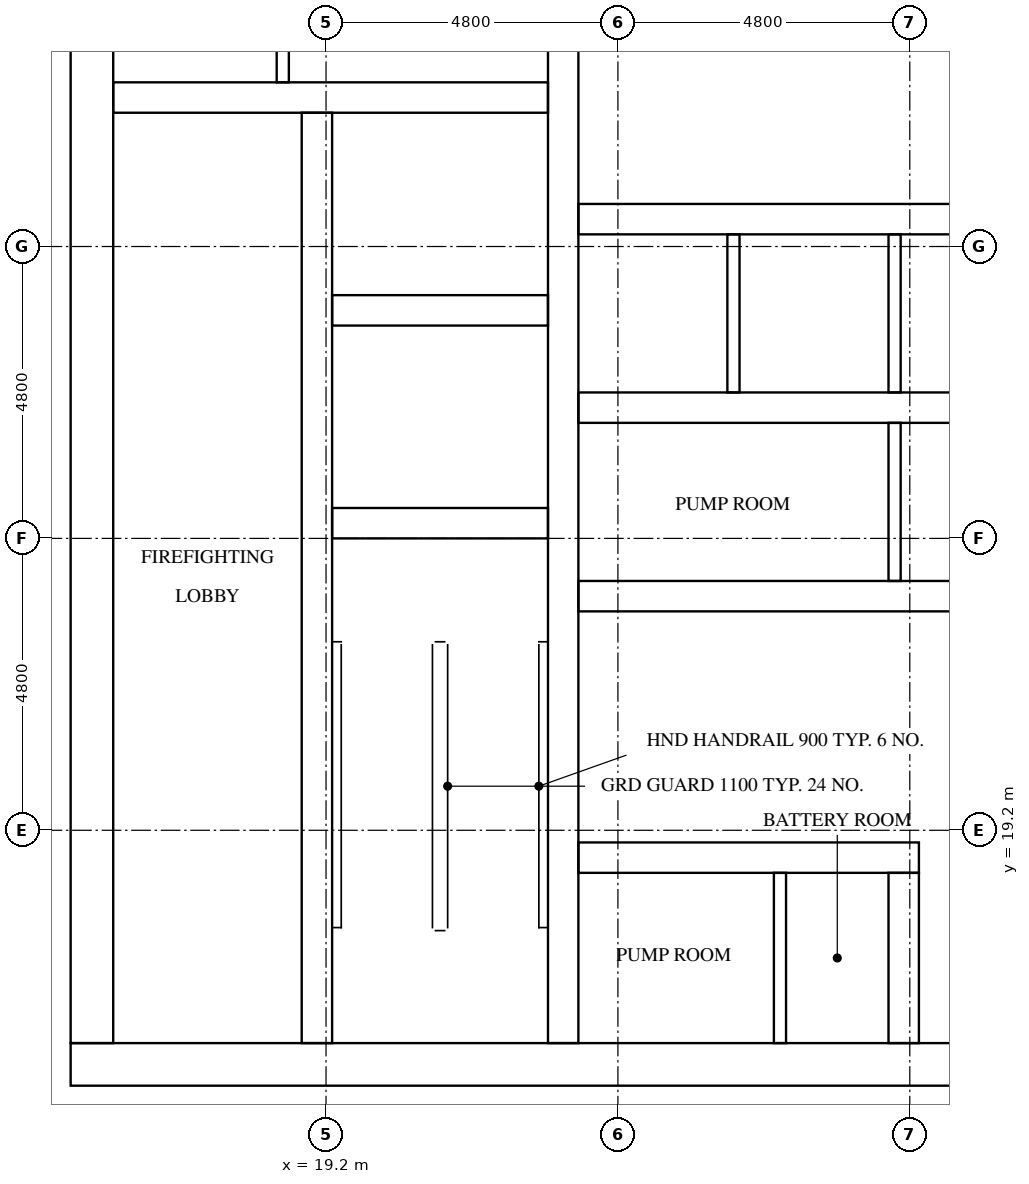
"""IFC4 building model, lengths in metres.
Left out: names, types, materials, properties, quantities, classifications, styles, units other than length and angle.
Written with IfcOpenShell. Run it as: python <this file> out.ifc"""

import sys

from ifc_helpers import new_model, si_unit, direction, frame, frame_2d, origin, place, context, subcontext, project, spatial, rectangle, extrude, element, fill, save


model = new_model("IFC4")
c1 = context("Model", 3, precision=1e-05, world=origin(), true_north=direction((0.0, 1.0)))
c2 = subcontext(c1, "Body", "Model", "MODEL_VIEW")
j1 = project(units=[si_unit("LENGTHUNIT", "METRE"), si_unit("PLANEANGLEUNIT", "RADIAN")], contexts=[c1])
p1 = place(None, origin())
s1 = spatial("IfcSite", under=j1, at=p1, CompositionType="ELEMENT")
p2 = place(p1, origin())
s2 = spatial("IfcBuilding", under=s1, at=p2, CompositionType="ELEMENT")
p3 = place(p2, frame((0.0, 0.0, 203.4)))
s3 = spatial("IfcBuildingStorey", under=s2, at=p3, CompositionType="ELEMENT", Elevation=203.4)
p4 = place(p3, frame((15.0, 15.35, 0.0), z_axis=(0.0, 0.0, 1.0), x_axis=(1.0, 0.0, 0.0)))
e1 = element("IfcWall", 1, at=p4, inside=s3, PredefinedType="SHEAR", context=c2, shape_type="SweptSolid", body=[
    extrude(rectangle(XDim=32.4, YDim=0.7, at=frame_2d((16.2, 0.0))), origin(), (0.0, 0.0, 1.0), 5.1),
])
p5 = place(p4, frame((15.3, 0.0, 0.0)))
e2 = element("IfcOpeningElement", 2, at=p5, cuts=e1, PredefinedType="OPENING", context=c2, shape_type="SweptSolid", body=[
    extrude(rectangle(XDim=1.8, YDim=2.1, at=frame_2d((0.9, 1.05))), frame((0.0, 0.36, 0.0), z_axis=(0.0, -1.0, 0.0), x_axis=(1.0, 0.0, 0.0)), (0.0, 0.0, 1.0), 0.72),
])
p6 = place(p3, frame((15.35, 15.7, 0.0), z_axis=(0.0, 0.0, 1.0), x_axis=(0.0, 1.0, 0.0)))
e3 = element("IfcWall", 3, at=p6, inside=s3, PredefinedType="SHEAR", context=c2, shape_type="SweptSolid", body=[
    extrude(rectangle(XDim=21.4, YDim=0.7, at=frame_2d((10.7, 0.0))), origin(), (0.0, 0.0, 1.0), 5.1),
])
p7 = place(p6, frame((5.06, 0.0, 0.0)))
e4 = element("IfcOpeningElement", 4, at=p7, cuts=e3, PredefinedType="OPENING", context=c2, shape_type="SweptSolid", body=[
    extrude(rectangle(XDim=1.2, YDim=2.1, at=frame_2d((0.6, 1.05))), frame((0.0, 0.36, 0.0), z_axis=(0.0, -1.0, 0.0), x_axis=(1.0, 0.0, 0.0)), (0.0, 0.0, 1.0), 0.72),
])
p8 = place(p3, frame((19.05, 15.7, 0.0), z_axis=(0.0, 0.0, 1.0), x_axis=(0.0, 1.0, 0.0)))
e5 = element("IfcWall", 5, at=p8, inside=s3, PredefinedType="SHEAR", context=c2, shape_type="SweptSolid", body=[
    extrude(rectangle(XDim=15.3, YDim=0.5, at=frame_2d((7.65, 0.0))), origin(), (0.0, 0.0, 1.0), 5.1),
])
p9 = place(p8, frame((9.75, 0.0, 0.0)))
e6 = element("IfcOpeningElement", 6, at=p9, cuts=e5, PredefinedType="OPENING", context=c2, shape_type="SweptSolid", body=[
    extrude(rectangle(XDim=1.1, YDim=2.1, at=frame_2d((0.55, 1.05))), frame((0.0, 0.26, 0.0), z_axis=(0.0, -1.0, 0.0), x_axis=(1.0, 0.0, 0.0)), (0.0, 0.0, 1.0), 0.52),
])
p10 = place(p8, frame((13.25, 0.0, 0.0)))
e7 = element("IfcOpeningElement", 7, at=p10, cuts=e5, PredefinedType="OPENING", context=c2, shape_type="SweptSolid", body=[
    extrude(rectangle(XDim=1.1, YDim=2.1, at=frame_2d((0.55, 1.05))), frame((0.0, 0.26, 0.0), z_axis=(0.0, -1.0, 0.0), x_axis=(1.0, 0.0, 0.0)), (0.0, 0.0, 1.0), 0.52),
])
p11 = place(p8, frame((0.5, 0.0, 0.0)))
e8 = element("IfcOpeningElement", 8, at=p11, cuts=e5, PredefinedType="OPENING", context=c2, shape_type="SweptSolid", body=[
    extrude(rectangle(XDim=1.2, YDim=2.1, at=frame_2d((0.6, 1.05))), frame((0.0, 0.26, 0.0), z_axis=(0.0, -1.0, 0.0), x_axis=(1.0, 0.0, 0.0)), (0.0, 0.0, 1.0), 0.52),
])
p12 = place(p3, frame((23.1, 15.7, 0.0), z_axis=(0.0, 0.0, 1.0), x_axis=(0.0, 1.0, 0.0)))
e9 = element("IfcWall", 9, at=p12, inside=s3, PredefinedType="SHEAR", context=c2, shape_type="SweptSolid", body=[
    extrude(rectangle(XDim=21.4, YDim=0.5, at=frame_2d((10.7, 0.0))), origin(), (0.0, 0.0, 1.0), 5.1),
])
for number, where, z_axis, x_axis in (
    (10, (19.3, 24.25, 0.0), (0.0, 0.0, 1.0), (1.0, 0.0, 0.0)),
    (11, (19.3, 27.75, 0.0), (0.0, 0.0, 1.0), (1.0, 0.0, 0.0)),
):
    element("IfcWall", number, at=place(p3, frame(where, z_axis=z_axis, x_axis=x_axis)), inside=s3, PredefinedType="SHEAR", context=c2, shape_type="SweptSolid", body=[
        extrude(rectangle(XDim=3.55, YDim=0.5, at=frame_2d((1.775, 0.0))), origin(), (0.0, 0.0, 1.0), 5.1),
    ])
p13 = place(p3, frame((15.7, 31.25, 0.0), z_axis=(0.0, 0.0, 1.0), x_axis=(1.0, 0.0, 0.0)))
e12 = element("IfcWall", 12, at=p13, inside=s3, PredefinedType="SHEAR", context=c2, shape_type="SweptSolid", body=[
    extrude(rectangle(XDim=7.15, YDim=0.5, at=frame_2d((3.575, 0.0))), origin(), (0.0, 0.0, 1.0), 5.1),
])
p14 = place(p3, frame((23.35, 18.75, 0.0), z_axis=(0.0, 0.0, 1.0), x_axis=(1.0, 0.0, 0.0)))
e13 = element("IfcWall", 13, at=p14, inside=s3, PredefinedType="SHEAR", context=c2, shape_type="SweptSolid", body=[
    extrude(rectangle(XDim=5.6, YDim=0.5, at=frame_2d((2.8, 0.0))), origin(), (0.0, 0.0, 1.0), 5.1),
])
p15 = place(p14, frame((1.107, 0.0, 0.0)))
e14 = element("IfcOpeningElement", 14, at=p15, cuts=e13, PredefinedType="OPENING", context=c2, shape_type="SweptSolid", body=[
    extrude(rectangle(XDim=1.0, YDim=2.1, at=frame_2d((0.5, 1.05))), frame((0.0, 0.26, 0.0), z_axis=(0.0, -1.0, 0.0), x_axis=(1.0, 0.0, 0.0)), (0.0, 0.0, 1.0), 0.52),
])
p16 = place(p14, frame((3.758, 0.0, 0.0)))
e15 = element("IfcOpeningElement", 15, at=p16, cuts=e13, PredefinedType="OPENING", context=c2, shape_type="SweptSolid", body=[
    extrude(rectangle(XDim=1.0, YDim=2.1, at=frame_2d((0.5, 1.05))), frame((0.0, 0.26, 0.0), z_axis=(0.0, -1.0, 0.0), x_axis=(1.0, 0.0, 0.0)), (0.0, 0.0, 1.0), 0.52),
])
p17 = place(p3, frame((23.35, 23.05, 0.0), z_axis=(0.0, 0.0, 1.0), x_axis=(1.0, 0.0, 0.0)))
e16 = element("IfcWall", 16, at=p17, inside=s3, PredefinedType="SHEAR", context=c2, shape_type="SweptSolid", body=[
    extrude(rectangle(XDim=15.7, YDim=0.5, at=frame_2d((7.85, 0.0))), origin(), (0.0, 0.0, 1.0), 5.1),
])
p18 = place(p17, frame((2.05, 0.0, 0.0)))
e17 = element("IfcOpeningElement", 17, at=p18, cuts=e16, PredefinedType="OPENING", context=c2, shape_type="SweptSolid", body=[
    extrude(rectangle(XDim=1.0, YDim=2.1, at=frame_2d((0.5, 1.05))), frame((0.0, 0.26, 0.0), z_axis=(0.0, -1.0, 0.0), x_axis=(1.0, 0.0, 0.0)), (0.0, 0.0, 1.0), 0.52),
])
p19 = place(p17, frame((11.784, 0.0, 0.0)))
e18 = element("IfcOpeningElement", 18, at=p19, cuts=e16, PredefinedType="OPENING", context=c2, shape_type="SweptSolid", body=[
    extrude(rectangle(XDim=1.0, YDim=2.1, at=frame_2d((0.5, 1.05))), frame((0.0, 0.26, 0.0), z_axis=(0.0, -1.0, 0.0), x_axis=(1.0, 0.0, 0.0)), (0.0, 0.0, 1.0), 0.52),
])
p20 = place(p17, frame((14.434, 0.0, 0.0)))
e19 = element("IfcOpeningElement", 19, at=p20, cuts=e16, PredefinedType="OPENING", context=c2, shape_type="SweptSolid", body=[
    extrude(rectangle(XDim=1.0, YDim=2.1, at=frame_2d((0.5, 1.05))), frame((0.0, 0.26, 0.0), z_axis=(0.0, -1.0, 0.0), x_axis=(1.0, 0.0, 0.0)), (0.0, 0.0, 1.0), 0.52),
])
p21 = place(p3, frame((23.35, 26.15, 0.0), z_axis=(0.0, 0.0, 1.0), x_axis=(1.0, 0.0, 0.0)))
e20 = element("IfcWall", 20, at=p21, inside=s3, PredefinedType="SHEAR", context=c2, shape_type="SweptSolid", body=[
    extrude(rectangle(XDim=15.7, YDim=0.5, at=frame_2d((7.85, 0.0))), origin(), (0.0, 0.0, 1.0), 5.1),
])
p22 = place(p3, frame((23.35, 29.25, 0.0), z_axis=(0.0, 0.0, 1.0), x_axis=(1.0, 0.0, 0.0)))
e21 = element("IfcWall", 21, at=p22, inside=s3, PredefinedType="SHEAR", context=c2, shape_type="SweptSolid", body=[
    extrude(rectangle(XDim=15.7, YDim=0.5, at=frame_2d((7.85, 0.0))), origin(), (0.0, 0.0, 1.0), 5.1),
])
p23 = place(p22, frame((0.675, 0.0, 0.0)))
e22 = element("IfcOpeningElement", 22, at=p23, cuts=e21, PredefinedType="OPENING", context=c2, shape_type="SweptSolid", body=[
    extrude(rectangle(XDim=1.1, YDim=2.1, at=frame_2d((0.55, 1.05))), frame((0.0, 0.26, 0.0), z_axis=(0.0, -1.0, 0.0), x_axis=(1.0, 0.0, 0.0)), (0.0, 0.0, 1.0), 0.52),
])
p24 = place(p22, frame((3.325, 0.0, 0.0)))
e23 = element("IfcOpeningElement", 23, at=p24, cuts=e21, PredefinedType="OPENING", context=c2, shape_type="SweptSolid", body=[
    extrude(rectangle(XDim=1.1, YDim=2.1, at=frame_2d((0.55, 1.05))), frame((0.0, 0.26, 0.0), z_axis=(0.0, -1.0, 0.0), x_axis=(1.0, 0.0, 0.0)), (0.0, 0.0, 1.0), 0.52),
])
p25 = place(p22, frame((5.975, 0.0, 0.0)))
e24 = element("IfcOpeningElement", 24, at=p25, cuts=e21, PredefinedType="OPENING", context=c2, shape_type="SweptSolid", body=[
    extrude(rectangle(XDim=1.1, YDim=2.1, at=frame_2d((0.55, 1.05))), frame((0.0, 0.26, 0.0), z_axis=(0.0, -1.0, 0.0), x_axis=(1.0, 0.0, 0.0)), (0.0, 0.0, 1.0), 0.52),
])
p26 = place(p22, frame((8.625, 0.0, 0.0)))
e25 = element("IfcOpeningElement", 25, at=p26, cuts=e21, PredefinedType="OPENING", context=c2, shape_type="SweptSolid", body=[
    extrude(rectangle(XDim=1.1, YDim=2.1, at=frame_2d((0.55, 1.05))), frame((0.0, 0.26, 0.0), z_axis=(0.0, -1.0, 0.0), x_axis=(1.0, 0.0, 0.0)), (0.0, 0.0, 1.0), 0.52),
])
p27 = place(p22, frame((11.275, 0.0, 0.0)))
e26 = element("IfcOpeningElement", 26, at=p27, cuts=e21, PredefinedType="OPENING", context=c2, shape_type="SweptSolid", body=[
    extrude(rectangle(XDim=1.1, YDim=2.1, at=frame_2d((0.55, 1.05))), frame((0.0, 0.26, 0.0), z_axis=(0.0, -1.0, 0.0), x_axis=(1.0, 0.0, 0.0)), (0.0, 0.0, 1.0), 0.52),
])
p28 = place(p22, frame((13.925, 0.0, 0.0)))
e27 = element("IfcOpeningElement", 27, at=p28, cuts=e21, PredefinedType="OPENING", context=c2, shape_type="SweptSolid", body=[
    extrude(rectangle(XDim=1.1, YDim=2.1, at=frame_2d((0.55, 1.05))), frame((0.0, 0.26, 0.0), z_axis=(0.0, -1.0, 0.0), x_axis=(1.0, 0.0, 0.0)), (0.0, 0.0, 1.0), 0.52),
])
p29 = place(p3, frame((28.7, 15.7, 0.0), z_axis=(0.0, 0.0, 1.0), x_axis=(0.0, 1.0, 0.0)))
e28 = element("IfcWall", 28, at=p29, inside=s3, PredefinedType="SHEAR", context=c2, shape_type="SweptSolid", body=[
    extrude(rectangle(XDim=2.8, YDim=0.5, at=frame_2d((1.4, 0.0))), origin(), (0.0, 0.0, 1.0), 5.1),
])
p30 = place(p3, frame((25.9, 26.4, 0.0), z_axis=(0.0, 0.0, 1.0), x_axis=(0.0, 1.0, 0.0)))
e29 = element("IfcWall", 29, at=p30, inside=s3, PredefinedType="SOLIDWALL", context=c2, shape_type="SweptSolid", body=[
    extrude(rectangle(XDim=2.6, YDim=0.2, at=frame_2d((1.3, 0.0))), origin(), (0.0, 0.0, 1.0), 5.1),
])
p31 = place(p3, frame((28.55, 23.3, 0.0), z_axis=(0.0, 0.0, 1.0), x_axis=(0.0, 1.0, 0.0)))
e30 = element("IfcWall", 30, at=p31, inside=s3, PredefinedType="SOLIDWALL", context=c2, shape_type="SweptSolid", body=[
    extrude(rectangle(XDim=2.6, YDim=0.2, at=frame_2d((1.3, 0.0))), origin(), (0.0, 0.0, 1.0), 5.1),
])
p32 = place(p3, frame((28.55, 26.4, 0.0), z_axis=(0.0, 0.0, 1.0), x_axis=(0.0, 1.0, 0.0)))
e31 = element("IfcWall", 31, at=p32, inside=s3, PredefinedType="SOLIDWALL", context=c2, shape_type="SweptSolid", body=[
    extrude(rectangle(XDim=2.6, YDim=0.2, at=frame_2d((1.3, 0.0))), origin(), (0.0, 0.0, 1.0), 5.1),
])
p33 = place(p3, frame((18.489, 31.5, 0.0), z_axis=(0.0, 0.0, 1.0), x_axis=(0.0, 1.0, 0.0)))
e32 = element("IfcWall", 32, at=p33, inside=s3, PredefinedType="PARTITIONING", context=c2, shape_type="SweptSolid", body=[
    extrude(rectangle(XDim=5.6, YDim=0.2, at=frame_2d((2.8, 0.0))), origin(), (0.0, 0.0, 1.0), 5.1),
])
p34 = place(p3, frame((26.665, 15.7, 0.0), z_axis=(0.0, 0.0, 1.0), x_axis=(0.0, 1.0, 0.0)))
e33 = element("IfcWall", 33, at=p34, inside=s3, PredefinedType="PARTITIONING", context=c2, shape_type="SweptSolid", body=[
    extrude(rectangle(XDim=2.8, YDim=0.2, at=frame_2d((1.4, 0.0))), origin(), (0.0, 0.0, 1.0), 5.1),
])
p35 = place(p23, origin())
e34 = element("IfcDoor", 34, at=p35, inside=s3, OperationType="DOUBLE_DOOR_SLIDING", PredefinedType="DOOR", context=c2, shape_type="SweptSolid", body=[
    extrude(rectangle(XDim=1.1, YDim=2.1, at=frame_2d((0.55, 1.05))), frame((0.0, 0.025, 0.0), z_axis=(0.0, -1.0, 0.0), x_axis=(1.0, 0.0, 0.0)), (0.0, 0.0, 1.0), 0.05),
])
fill(e22, e34)
p36 = place(p24, origin())
e35 = element("IfcDoor", 35, at=p36, inside=s3, OperationType="DOUBLE_DOOR_SLIDING", PredefinedType="DOOR", context=c2, shape_type="SweptSolid", body=[
    extrude(rectangle(XDim=1.1, YDim=2.1, at=frame_2d((0.55, 1.05))), frame((0.0, 0.025, 0.0), z_axis=(0.0, -1.0, 0.0), x_axis=(1.0, 0.0, 0.0)), (0.0, 0.0, 1.0), 0.05),
])
fill(e23, e35)
p37 = place(p25, origin())
e36 = element("IfcDoor", 36, at=p37, inside=s3, OperationType="DOUBLE_DOOR_SLIDING", PredefinedType="DOOR", context=c2, shape_type="SweptSolid", body=[
    extrude(rectangle(XDim=1.1, YDim=2.1, at=frame_2d((0.55, 1.05))), frame((0.0, 0.025, 0.0), z_axis=(0.0, -1.0, 0.0), x_axis=(1.0, 0.0, 0.0)), (0.0, 0.0, 1.0), 0.05),
])
fill(e24, e36)
p38 = place(p9, origin())
e37 = element("IfcDoor", 37, at=p38, inside=s3, OperationType="DOUBLE_DOOR_SLIDING", PredefinedType="DOOR", context=c2, shape_type="SweptSolid", body=[
    extrude(rectangle(XDim=1.1, YDim=2.1, at=frame_2d((0.55, 1.05))), frame((0.0, 0.025, 0.0), z_axis=(0.0, -1.0, 0.0), x_axis=(1.0, 0.0, 0.0)), (0.0, 0.0, 1.0), 0.05),
])
fill(e6, e37)
p39 = place(p10, origin())
e38 = element("IfcDoor", 38, at=p39, inside=s3, OperationType="DOUBLE_DOOR_SLIDING", PredefinedType="DOOR", context=c2, shape_type="SweptSolid", body=[
    extrude(rectangle(XDim=1.1, YDim=2.1, at=frame_2d((0.55, 1.05))), frame((0.0, 0.025, 0.0), z_axis=(0.0, -1.0, 0.0), x_axis=(1.0, 0.0, 0.0)), (0.0, 0.0, 1.0), 0.05),
])
fill(e7, e38)
p40 = place(p11, frame((1.2, 0.0, 0.0), z_axis=(0.0, 0.0, 1.0), x_axis=(-1.0, 0.0, 0.0)))
e39 = element("IfcDoor", 39, at=p40, inside=s3, OperationType="SINGLE_SWING_LEFT", PredefinedType="DOOR", context=c2, shape_type="SweptSolid", body=[
    extrude(rectangle(XDim=1.2, YDim=2.1, at=frame_2d((0.6, 1.05))), frame((0.0, 0.025, 0.0), z_axis=(0.0, -1.0, 0.0), x_axis=(1.0, 0.0, 0.0)), (0.0, 0.0, 1.0), 0.05),
])
fill(e8, e39)
p41 = place(p7, frame((1.2, 0.0, 0.0), z_axis=(0.0, 0.0, 1.0), x_axis=(-1.0, 0.0, 0.0)))
e40 = element("IfcDoor", 40, at=p41, inside=s3, OperationType="SINGLE_SWING_RIGHT", PredefinedType="DOOR", context=c2, shape_type="SweptSolid", body=[
    extrude(rectangle(XDim=1.2, YDim=2.1, at=frame_2d((0.6, 1.05))), frame((0.0, 0.025, 0.0), z_axis=(0.0, -1.0, 0.0), x_axis=(1.0, 0.0, 0.0)), (0.0, 0.0, 1.0), 0.05),
])
fill(e4, e40)
p42 = place(p18, frame((1.0, 0.0, 0.0), z_axis=(0.0, 0.0, 1.0), x_axis=(-1.0, 0.0, 0.0)))
e41 = element("IfcDoor", 41, at=p42, inside=s3, OperationType="SINGLE_SWING_RIGHT", PredefinedType="DOOR", context=c2, shape_type="SweptSolid", body=[
    extrude(rectangle(XDim=1.0, YDim=2.1, at=frame_2d((0.5, 1.05))), frame((0.0, 0.025, 0.0), z_axis=(0.0, -1.0, 0.0), x_axis=(1.0, 0.0, 0.0)), (0.0, 0.0, 1.0), 0.05),
])
fill(e17, e41)
p43 = place(p15, origin())
e42 = element("IfcDoor", 42, at=p43, inside=s3, OperationType="SINGLE_SWING_LEFT", PredefinedType="DOOR", context=c2, shape_type="SweptSolid", body=[
    extrude(rectangle(XDim=1.0, YDim=2.1, at=frame_2d((0.5, 1.05))), frame((0.0, 0.025, 0.0), z_axis=(0.0, -1.0, 0.0), x_axis=(1.0, 0.0, 0.0)), (0.0, 0.0, 1.0), 0.05),
])
fill(e14, e42)
p44 = place(p16, origin())
e43 = element("IfcDoor", 43, at=p44, inside=s3, OperationType="SINGLE_SWING_RIGHT", PredefinedType="DOOR", context=c2, shape_type="SweptSolid", body=[
    extrude(rectangle(XDim=1.0, YDim=2.1, at=frame_2d((0.5, 1.05))), frame((0.0, 0.025, 0.0), z_axis=(0.0, -1.0, 0.0), x_axis=(1.0, 0.0, 0.0)), (0.0, 0.0, 1.0), 0.05),
])
fill(e15, e43)
save(model, sys.argv[1])
